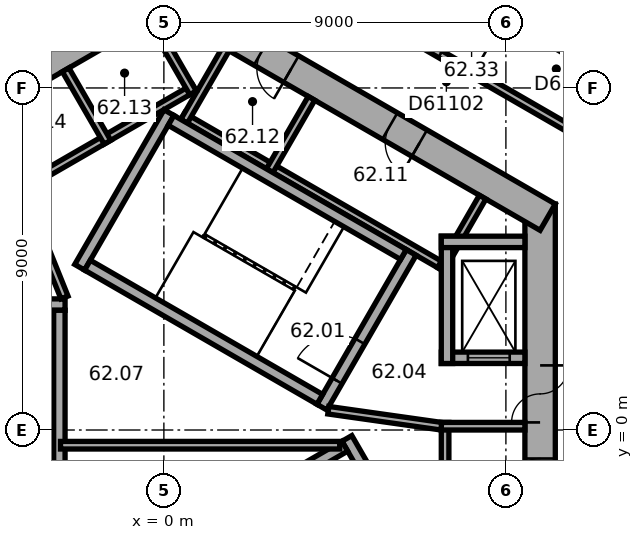
"""IFC4 building model, lengths in metres.
Left out: names, types, materials, properties, quantities, classifications, styles, units other than length and angle.
Written with IfcOpenShell. Run it as: python <this file> out.ifc"""

import sys

from ifc_helpers import new_model, si_unit, direction, frame, frame_2d, origin, place, context, subcontext, project, spatial, rectangle, extrude, element, fill, save


model = new_model("IFC4")
c1 = context("Model", 3, precision=1e-05, world=origin(), true_north=direction((0.0, 1.0)))
c2 = subcontext(c1, "Body", "Model", "MODEL_VIEW")
j1 = project(units=[si_unit("LENGTHUNIT", "METRE"), si_unit("PLANEANGLEUNIT", "RADIAN")], contexts=[c1])
p1 = place(None, origin())
s1 = spatial("IfcSite", under=j1, at=p1, CompositionType="ELEMENT")
p2 = place(p1, origin())
s2 = spatial("IfcBuilding", under=s1, at=p2, CompositionType="ELEMENT")
p3 = place(p2, frame((0.0, 0.0, 251.3)))
s3 = spatial("IfcBuildingStorey", under=s2, at=p3, CompositionType="ELEMENT", Elevation=251.3)
p4 = place(p3, frame((9.9, -5.947, 0.0), z_axis=(0.0, 0.0, 1.0), x_axis=(0.0, 1.0, 0.0)))
e1 = element("IfcWall", 1, at=p4, inside=s3, PredefinedType="SHEAR", context=c2, shape_type="SweptSolid", body=[
    extrude(rectangle(XDim=11.894, YDim=0.8, at=frame_2d((5.947, 0.0))), origin(), (0.0, 0.0, 1.0), 3.7),
])
p5 = place(p4, frame((6.147, 0.0, 0.0)))
e2 = element("IfcOpeningElement", 2, at=p5, cuts=e1, PredefinedType="OPENING", context=c2, shape_type="SweptSolid", body=[
    extrude(rectangle(XDim=1.5, YDim=2.1, at=frame_2d((0.75, 1.05))), frame((0.0, 0.41, 0.0), z_axis=(0.0, -1.0, 0.0), x_axis=(1.0, 0.0, 0.0)), (0.0, 0.0, 1.0), 0.82),
])
p6 = place(p4, frame((1.697, 0.0, 0.0)))
e3 = element("IfcOpeningElement", 3, at=p6, cuts=e1, PredefinedType="OPENING", context=c2, shape_type="SweptSolid", body=[
    extrude(rectangle(XDim=0.9, YDim=2.1, at=frame_2d((0.45, 1.05))), frame((0.0, 0.41, 0.0), z_axis=(0.0, -1.0, 0.0), x_axis=(1.0, 0.0, 0.0)), (0.0, 0.0, 1.0), 0.82),
])
p7 = place(p4, frame((4.297, 0.0, 0.0)))
e4 = element("IfcOpeningElement", 4, at=p7, cuts=e1, PredefinedType="OPENING", context=c2, shape_type="SweptSolid", body=[
    extrude(rectangle(XDim=0.9, YDim=2.1, at=frame_2d((0.45, 1.05))), frame((0.0, 0.41, 0.0), z_axis=(0.0, -1.0, 0.0), x_axis=(1.0, 0.0, 0.0)), (0.0, 0.0, 1.0), 0.82),
])
p8 = place(p3, frame((10.1, 5.6, 0.0), z_axis=(0.0, 0.0, 1.0), x_axis=(-0.866023897231, 0.500002609418, 0.0)))
e5 = element("IfcWall", 5, at=p8, inside=s3, PredefinedType="SHEAR", context=c2, shape_type="SweptSolid", body=[
    extrude(rectangle(XDim=11.894, YDim=0.8, at=frame_2d((5.947, 0.0))), origin(), (0.0, 0.0, 1.0), 3.7),
])
p9 = place(p8, frame((3.897, 0.0, 0.0)))
e6 = element("IfcOpeningElement", 6, at=p9, cuts=e5, PredefinedType="OPENING", context=c2, shape_type="SweptSolid", body=[
    extrude(rectangle(XDim=0.9, YDim=2.1, at=frame_2d((0.45, 1.05))), frame((0.0, 0.41, 0.0), z_axis=(0.0, -1.0, 0.0), x_axis=(1.0, 0.0, 0.0)), (0.0, 0.0, 1.0), 0.82),
])
p10 = place(p8, frame((7.797, 0.0, 0.0)))
e7 = element("IfcOpeningElement", 7, at=p10, cuts=e5, PredefinedType="OPENING", context=c2, shape_type="SweptSolid", body=[
    extrude(rectangle(XDim=0.9, YDim=2.1, at=frame_2d((0.45, 1.05))), frame((0.0, 0.41, 0.0), z_axis=(0.0, -1.0, 0.0), x_axis=(1.0, 0.0, 0.0)), (0.0, 0.0, 1.0), 0.82),
])
p11 = place(p3, frame((0.2, 11.547, 0.0), z_axis=(0.0, 0.0, 1.0), x_axis=(-0.866023897231, -0.500002609418, 0.0)))
e8 = element("IfcWall", 8, at=p11, inside=s3, PredefinedType="SHEAR", context=c2, shape_type="SweptSolid", body=[
    extrude(rectangle(XDim=11.894, YDim=0.8, at=frame_2d((5.947, 0.0))), origin(), (0.0, 0.0, 1.0), 3.7),
])
p12 = place(p11, frame((6.147, 0.0, 0.0)))
e9 = element("IfcOpeningElement", 9, at=p12, cuts=e8, PredefinedType="OPENING", context=c2, shape_type="SweptSolid", body=[
    extrude(rectangle(XDim=1.5, YDim=2.1, at=frame_2d((0.75, 1.05))), frame((0.0, 0.41, 0.0), z_axis=(0.0, -1.0, 0.0), x_axis=(1.0, 0.0, 0.0)), (0.0, 0.0, 1.0), 0.82),
])
p13 = place(p11, frame((1.697, 0.0, 0.0)))
e10 = element("IfcOpeningElement", 10, at=p13, cuts=e8, PredefinedType="OPENING", context=c2, shape_type="SweptSolid", body=[
    extrude(rectangle(XDim=0.9, YDim=2.1, at=frame_2d((0.45, 1.05))), frame((0.0, 0.41, 0.0), z_axis=(0.0, -1.0, 0.0), x_axis=(1.0, 0.0, 0.0)), (0.0, 0.0, 1.0), 0.82),
])
p14 = place(p11, frame((4.297, 0.0, 0.0)))
e11 = element("IfcOpeningElement", 11, at=p14, cuts=e8, PredefinedType="OPENING", context=c2, shape_type="SweptSolid", body=[
    extrude(rectangle(XDim=0.9, YDim=2.1, at=frame_2d((0.45, 1.05))), frame((0.0, 0.41, 0.0), z_axis=(0.0, -1.0, 0.0), x_axis=(1.0, 0.0, 0.0)), (0.0, 0.0, 1.0), 0.82),
])
p15 = place(p3, frame((7.4, -5.2, 0.0), z_axis=(0.0, 0.0, 1.0), x_axis=(0.0, 1.0, 0.0)))
e12 = element("IfcWall", 12, at=p15, inside=s3, PredefinedType="PARTITIONING", context=c2, shape_type="SweptSolid", body=[
    extrude(rectangle(XDim=5.4, YDim=0.2, at=frame_2d((2.7, 0.0))), origin(), (0.0, 0.0, 1.0), 3.35),
])
p16 = place(p3, frame((7.3, 0.1, 0.0), z_axis=(0.0, 0.0, 1.0), x_axis=(1.0, 0.0, 0.0)))
e13 = element("IfcWall", 13, at=p16, inside=s3, PredefinedType="PARTITIONING", context=c2, shape_type="SweptSolid", body=[
    extrude(rectangle(XDim=2.2, YDim=0.2, at=frame_2d((1.1, 0.0))), origin(), (0.0, 0.0, 1.0), 3.35),
])
p17 = place(p3, frame((7.424, 4.259, 0.0), z_axis=(0.0, 0.0, 1.0), x_axis=(-0.866026010844, 0.49999894854, 0.0)))
e14 = element("IfcWall", 14, at=p17, inside=s3, PredefinedType="PARTITIONING", context=c2, shape_type="SweptSolid", body=[
    extrude(rectangle(XDim=8.0, YDim=0.2, at=frame_2d((4.0, 0.0))), origin(), (0.0, 0.0, 1.0), 3.35),
])
for number, where, z_axis, x_axis in (
    (15, (7.287, 4.222, 0.0), (0.0, 0.0, 1.0), (0.5, 0.866, 0.0)),
    (16, (2.784, 6.822, 0.0), (0.0, 0.0, 1.0), (0.5, 0.866, 0.0)),
    (17, (0.532, 8.122, 0.0), (0.0, 0.0, 1.0), (0.5, 0.866, 0.0)),
):
    element("IfcWall", number, at=place(p3, frame(where, z_axis=z_axis, x_axis=x_axis)), inside=s3, PredefinedType="PARTITIONING", context=c2, shape_type="SweptSolid", body=[
        extrude(rectangle(XDim=2.2, YDim=0.2, at=frame_2d((1.1, 0.0))), origin(), (0.0, 0.0, 1.0), 3.35),
    ])
p18 = place(p3, frame((0.803, 9.009, 0.0), z_axis=(0.0, 0.0, 1.0), x_axis=(-0.866028230842, -0.499995103361, 0.0)))
e18 = element("IfcWall", 18, at=p18, inside=s3, PredefinedType="PARTITIONING", context=c2, shape_type="SweptSolid", body=[
    extrude(rectangle(XDim=5.4, YDim=0.2, at=frame_2d((2.7, 0.0))), origin(), (0.0, 0.0, 1.0), 3.35),
])
p19 = place(p3, frame((0.767, 8.872, 0.0), z_axis=(0.0, 0.0, 1.0), x_axis=(-0.499994660107, 0.866028486751, 0.0)))
e19 = element("IfcWall", 19, at=p19, inside=s3, PredefinedType="PARTITIONING", context=c2, shape_type="SweptSolid", body=[
    extrude(rectangle(XDim=2.2, YDim=0.2, at=frame_2d((1.1, 0.0))), origin(), (0.0, 0.0, 1.0), 3.35),
])
p20 = place(p3, frame((-1.485, 7.572, 0.0), z_axis=(0.0, 0.0, 1.0), x_axis=(-0.50002983664, 0.866008176907, 0.0)))
e20 = element("IfcWall", 20, at=p20, inside=s3, PredefinedType="PARTITIONING", context=c2, shape_type="SweptSolid", body=[
    extrude(rectangle(XDim=2.2, YDim=0.2, at=frame_2d((1.1, 0.0))), origin(), (0.0, 0.0, 1.0), 3.35),
])
p21 = place(p3, frame((4.158, 0.602, 0.0), z_axis=(0.0, 0.0, 1.0), x_axis=(0.499977259774, 0.866038532462, 0.0)))
e21 = element("IfcWall", 21, at=p21, inside=s3, PredefinedType="SHEAR", context=c2, shape_type="SweptSolid", body=[
    extrude(rectangle(XDim=4.7, YDim=0.3, at=frame_2d((2.35, 0.0))), origin(), (0.0, 0.0, 1.0), 3.35),
])
p22 = place(p21, frame((0.8, 0.0, 0.0)))
e22 = element("IfcOpeningElement", 22, at=p22, cuts=e21, PredefinedType="OPENING", context=c2, shape_type="SweptSolid", body=[
    extrude(rectangle(XDim=1.2, YDim=2.1, at=frame_2d((0.6, 1.05))), frame((0.0, 0.16, 0.0), z_axis=(0.0, -1.0, 0.0), x_axis=(1.0, 0.0, 0.0)), (0.0, 0.0, 1.0), 0.32),
])
p23 = place(p3, frame((-2.216, 4.282, 0.0), z_axis=(0.0, 0.0, 1.0), x_axis=(0.499977259774, 0.866038532462, 0.0)))
e23 = element("IfcWall", 23, at=p23, inside=s3, PredefinedType="SHEAR", context=c2, shape_type="SweptSolid", body=[
    extrude(rectangle(XDim=4.7, YDim=0.3, at=frame_2d((2.35, 0.0))), origin(), (0.0, 0.0, 1.0), 3.35),
])
for number, where, z_axis, x_axis in (
    (24, (4.103, 0.807, 0.0), (0.0, 0.0, 1.0), (-0.866, 0.5, 0.0)),
    (25, (6.303, 4.617, 0.0), (0.0, 0.0, 1.0), (-0.866, 0.5, 0.0)),
):
    element("IfcWall", number, at=place(p3, frame(where, z_axis=z_axis, x_axis=x_axis)), inside=s3, PredefinedType="SHEAR", context=c2, shape_type="SweptSolid", body=[
        extrude(rectangle(XDim=7.06, YDim=0.3, at=frame_2d((3.53, 0.0))), origin(), (0.0, 0.0, 1.0), 3.35),
    ])
p24 = place(p3, frame((-2.6, 3.3, 0.0), z_axis=(0.0, 0.0, 1.0), x_axis=(-1.0, 0.0, 0.0)))
e26 = element("IfcWall", 26, at=p24, inside=s3, PredefinedType="SHEAR", context=c2, shape_type="SweptSolid", body=[
    extrude(rectangle(XDim=4.7, YDim=0.3, at=frame_2d((2.35, 0.0))), origin(), (0.0, 0.0, 1.0), 3.35),
])
p25 = place(p24, frame((0.8, 0.0, 0.0)))
e27 = element("IfcOpeningElement", 27, at=p25, cuts=e26, PredefinedType="OPENING", context=c2, shape_type="SweptSolid", body=[
    extrude(rectangle(XDim=1.2, YDim=2.1, at=frame_2d((0.6, 1.05))), frame((0.0, 0.16, 0.0), z_axis=(0.0, -1.0, 0.0), x_axis=(1.0, 0.0, 0.0)), (0.0, 0.0, 1.0), 0.32),
])
p26 = place(p3, frame((-2.75, 3.15, 0.0), z_axis=(0.0, 0.0, 1.0), x_axis=(0.0, -1.0, 0.0)))
e28 = element("IfcWall", 28, at=p26, inside=s3, PredefinedType="SHEAR", context=c2, shape_type="SweptSolid", body=[
    extrude(rectangle(XDim=7.06, YDim=0.3, at=frame_2d((3.53, 0.0))), origin(), (0.0, 0.0, 1.0), 3.35),
])
p27 = place(p3, frame((4.816, -0.222, 0.0), z_axis=(0.0, 0.0, 1.0), x_axis=(0.499977259774, -0.866038532462, 0.0)))
e29 = element("IfcWall", 29, at=p27, inside=s3, PredefinedType="SHEAR", context=c2, shape_type="SweptSolid", body=[
    extrude(rectangle(XDim=4.7, YDim=0.3, at=frame_2d((2.35, 0.0))), origin(), (0.0, 0.0, 1.0), 3.35),
])
p28 = place(p3, frame((-1.353, -3.957, 0.0), z_axis=(0.0, 0.0, 1.0), x_axis=(0.866027801685, 0.499995846692, 0.0)))
e30 = element("IfcWall", 30, at=p28, inside=s3, PredefinedType="SHEAR", context=c2, shape_type="SweptSolid", body=[
    extrude(rectangle(XDim=7.06, YDim=0.3, at=frame_2d((3.53, 0.0))), origin(), (0.0, 0.0, 1.0), 3.35),
])
p29 = place(p3, frame((7.3, 1.9, 0.0), z_axis=(0.0, 0.0, 1.0), x_axis=(1.0, 0.0, 0.0)))
e31 = element("IfcWall", 31, at=p29, inside=s3, PredefinedType="SHEAR", context=c2, shape_type="SweptSolid", body=[
    extrude(rectangle(XDim=2.2, YDim=0.3, at=frame_2d((1.1, 0.0))), origin(), (0.0, 0.0, 1.0), 3.35),
])
p30 = place(p29, frame((0.7, 0.0, 0.0)))
e32 = element("IfcOpeningElement", 32, at=p30, cuts=e31, PredefinedType="OPENING", context=c2, shape_type="SweptSolid", body=[
    extrude(rectangle(XDim=1.1, YDim=2.1, at=frame_2d((0.55, 1.05))), frame((0.0, 0.16, 0.0), z_axis=(0.0, -1.0, 0.0), x_axis=(1.0, 0.0, 0.0)), (0.0, 0.0, 1.0), 0.32),
])
p31 = place(p3, frame((7.45, 1.75, 0.0), z_axis=(0.0, 0.0, 1.0), x_axis=(0.0, 1.0, 0.0)))
e33 = element("IfcWall", 33, at=p31, inside=s3, PredefinedType="SHEAR", context=c2, shape_type="SweptSolid", body=[
    extrude(rectangle(XDim=3.35, YDim=0.3, at=frame_2d((1.675, 0.0))), origin(), (0.0, 0.0, 1.0), 3.35),
])
p32 = place(p3, frame((7.3, 4.95, 0.0), z_axis=(0.0, 0.0, 1.0), x_axis=(1.0, 0.0, 0.0)))
e34 = element("IfcWall", 34, at=p32, inside=s3, PredefinedType="SHEAR", context=c2, shape_type="SweptSolid", body=[
    extrude(rectangle(XDim=2.2, YDim=0.3, at=frame_2d((1.1, 0.0))), origin(), (0.0, 0.0, 1.0), 3.35),
])
p33 = place(p3, frame((4.327, 0.521, 0.0), z_axis=(0.0, 0.0, 1.0), x_axis=(0.990124376366, -0.14019172346, 0.0)))
e35 = element("IfcWall", 35, at=p33, inside=s3, PredefinedType="PARTITIONING", context=c2, shape_type="SweptSolid", body=[
    extrude(rectangle(XDim=3.002, YDim=0.2, at=frame_2d((1.501, 0.0))), origin(), (0.0, 0.0, 1.0), 3.35),
])
p34 = place(p3, frame((-2.615, 3.487, 0.0), z_axis=(0.0, 0.0, 1.0), x_axis=(-0.373576831041, 0.92759924068, 0.0)))
e36 = element("IfcWall", 36, at=p34, inside=s3, PredefinedType="PARTITIONING", context=c2, shape_type="SweptSolid", body=[
    extrude(rectangle(XDim=3.002, YDim=0.2, at=frame_2d((1.501, 0.0))), origin(), (0.0, 0.0, 1.0), 3.35),
])
p35 = place(p34, frame((1.15, 0.0, 0.0)))
e37 = element("IfcOpeningElement", 37, at=p35, cuts=e36, PredefinedType="OPENING", context=c2, shape_type="SweptSolid", body=[
    extrude(rectangle(XDim=0.9, YDim=2.1, at=frame_2d((0.45, 1.05))), frame((0.0, 0.11, 0.0), z_axis=(0.0, -1.0, 0.0), x_axis=(1.0, 0.0, 0.0)), (0.0, 0.0, 1.0), 0.22),
])
p36 = place(p3, frame((-2.72, -0.4, 0.0), z_axis=(0.0, 0.0, 1.0), x_axis=(1.0, 0.0, 0.0)))
e38 = element("IfcWall", 38, at=p36, inside=s3, PredefinedType="PARTITIONING", context=c2, shape_type="SweptSolid", body=[
    extrude(rectangle(XDim=7.347, YDim=0.2, at=frame_2d((3.674, 0.0))), origin(), (0.0, 0.0, 1.0), 3.35),
])
p37 = place(p3, frame((11.25, 7.592, 0.0), z_axis=(0.0, 0.0, 1.0), x_axis=(-0.866024037175, 0.500002367029, 0.0)))
e39 = element("IfcWall", 39, at=p37, inside=s3, PredefinedType="PARTITIONING", context=c2, shape_type="SweptSolid", body=[
    extrude(rectangle(XDim=11.854, YDim=0.2, at=frame_2d((5.927, 0.0))), origin(), (0.0, 0.0, 1.0), 3.35),
])
p38 = place(p37, frame((3.59, 0.0, 0.0)))
e40 = element("IfcOpeningElement", 40, at=p38, cuts=e39, PredefinedType="OPENING", context=c2, shape_type="SweptSolid", body=[
    extrude(rectangle(XDim=1.0, YDim=2.1, at=frame_2d((0.5, 1.05))), frame((0.0, 0.11, 0.0), z_axis=(0.0, -1.0, 0.0), x_axis=(1.0, 0.0, 0.0)), (0.0, 0.0, 1.0), 0.22),
])
p39 = place(p3, frame((11.447, 9.441, 0.0), z_axis=(0.0, 0.0, 1.0), x_axis=(-0.866016001002, 0.500016285743, 0.0)))
e41 = element("IfcWall", 41, at=p39, inside=s3, PredefinedType="PARTITIONING", context=c2, shape_type="SweptSolid", body=[
    extrude(rectangle(XDim=6.881, YDim=0.12, at=frame_2d((3.44, 0.0))), origin(), (0.0, 0.0, 1.0), 3.35),
])
p40 = place(p39, frame((0.5, 0.0, 0.0)))
e42 = element("IfcOpeningElement", 42, at=p40, cuts=e41, PredefinedType="OPENING", context=c2, shape_type="SweptSolid", body=[
    extrude(rectangle(XDim=1.0, YDim=2.1, at=frame_2d((0.5, 1.05))), frame((0.0, 0.07, 0.0), z_axis=(0.0, -1.0, 0.0), x_axis=(1.0, 0.0, 0.0)), (0.0, 0.0, 1.0), 0.14),
])
p41 = place(p39, frame((2.583, 0.0, 0.0)))
e43 = element("IfcOpeningElement", 43, at=p41, cuts=e41, PredefinedType="OPENING", context=c2, shape_type="SweptSolid", body=[
    extrude(rectangle(XDim=0.9, YDim=2.1, at=frame_2d((0.45, 1.05))), frame((0.0, 0.07, 0.0), z_axis=(0.0, -1.0, 0.0), x_axis=(1.0, 0.0, 0.0)), (0.0, 0.0, 1.0), 0.14),
])
p42 = place(p39, frame((5.023, 0.0, 0.0)))
e44 = element("IfcOpeningElement", 44, at=p42, cuts=e41, PredefinedType="OPENING", context=c2, shape_type="SweptSolid", body=[
    extrude(rectangle(XDim=0.9, YDim=2.1, at=frame_2d((0.45, 1.05))), frame((0.0, 0.07, 0.0), z_axis=(0.0, -1.0, 0.0), x_axis=(1.0, 0.0, 0.0)), (0.0, 0.0, 1.0), 0.14),
])
p43 = place(p5, origin())
e45 = element("IfcDoor", 45, at=p43, inside=s3, OperationType="DOUBLE_DOOR_SINGLE_SWING", PredefinedType="DOOR", context=c2, shape_type="SweptSolid", body=[
    extrude(rectangle(XDim=1.5, YDim=2.1, at=frame_2d((0.75, 1.05))), frame((0.0, 0.025, 0.0), z_axis=(0.0, -1.0, 0.0), x_axis=(1.0, 0.0, 0.0)), (0.0, 0.0, 1.0), 0.05),
])
fill(e2, e45)
p44 = place(p22, origin())
e46 = element("IfcDoor", 46, at=p44, inside=s3, OperationType="SINGLE_SWING_RIGHT", PredefinedType="DOOR", context=c2, shape_type="SweptSolid", body=[
    extrude(rectangle(XDim=1.2, YDim=2.1, at=frame_2d((0.6, 1.05))), frame((0.0, 0.025, 0.0), z_axis=(0.0, -1.0, 0.0), x_axis=(1.0, 0.0, 0.0)), (0.0, 0.0, 1.0), 0.05),
])
fill(e22, e46)
p45 = place(p7, origin())
e47 = element("IfcDoor", 47, at=p45, inside=s3, OperationType="SINGLE_SWING_LEFT", PredefinedType="DOOR", context=c2, shape_type="SweptSolid", body=[
    extrude(rectangle(XDim=0.9, YDim=2.1, at=frame_2d((0.45, 1.05))), frame((0.0, 0.025, 0.0), z_axis=(0.0, -1.0, 0.0), x_axis=(1.0, 0.0, 0.0)), (0.0, 0.0, 1.0), 0.05),
])
fill(e4, e47)
p46 = place(p9, origin())
e48 = element("IfcDoor", 48, at=p46, inside=s3, OperationType="SINGLE_SWING_LEFT", PredefinedType="DOOR", context=c2, shape_type="SweptSolid", body=[
    extrude(rectangle(XDim=0.9, YDim=2.1, at=frame_2d((0.45, 1.05))), frame((0.0, 0.025, 0.0), z_axis=(0.0, -1.0, 0.0), x_axis=(1.0, 0.0, 0.0)), (0.0, 0.0, 1.0), 0.05),
])
fill(e6, e48)
p47 = place(p10, origin())
e49 = element("IfcDoor", 49, at=p47, inside=s3, OperationType="SINGLE_SWING_LEFT", PredefinedType="DOOR", context=c2, shape_type="SweptSolid", body=[
    extrude(rectangle(XDim=0.9, YDim=2.1, at=frame_2d((0.45, 1.05))), frame((0.0, 0.025, 0.0), z_axis=(0.0, -1.0, 0.0), x_axis=(1.0, 0.0, 0.0)), (0.0, 0.0, 1.0), 0.05),
])
fill(e7, e49)
p48 = place(p30, origin())
e50 = element("IfcDoor", 50, at=p48, inside=s3, OperationType="DOUBLE_DOOR_SLIDING", PredefinedType="DOOR", context=c2, shape_type="SweptSolid", body=[
    extrude(rectangle(XDim=1.1, YDim=2.1, at=frame_2d((0.55, 1.05))), frame((0.0, 0.025, 0.0), z_axis=(0.0, -1.0, 0.0), x_axis=(1.0, 0.0, 0.0)), (0.0, 0.0, 1.0), 0.05),
])
fill(e32, e50)
p49 = place(p38, origin())
e51 = element("IfcDoor", 51, at=p49, inside=s3, OperationType="SINGLE_SWING_LEFT", PredefinedType="DOOR", context=c2, shape_type="SweptSolid", body=[
    extrude(rectangle(XDim=1.0, YDim=2.1, at=frame_2d((0.5, 1.05))), frame((0.0, 0.025, 0.0), z_axis=(0.0, -1.0, 0.0), x_axis=(1.0, 0.0, 0.0)), (0.0, 0.0, 1.0), 0.05),
])
fill(e40, e51)
p50 = place(p40, origin())
e52 = element("IfcDoor", 52, at=p50, inside=s3, OperationType="SINGLE_SWING_LEFT", PredefinedType="DOOR", context=c2, shape_type="SweptSolid", body=[
    extrude(rectangle(XDim=1.0, YDim=2.1, at=frame_2d((0.5, 1.05))), frame((0.0, 0.025, 0.0), z_axis=(0.0, -1.0, 0.0), x_axis=(1.0, 0.0, 0.0)), (0.0, 0.0, 1.0), 0.05),
])
fill(e42, e52)
save(model, sys.argv[1])
